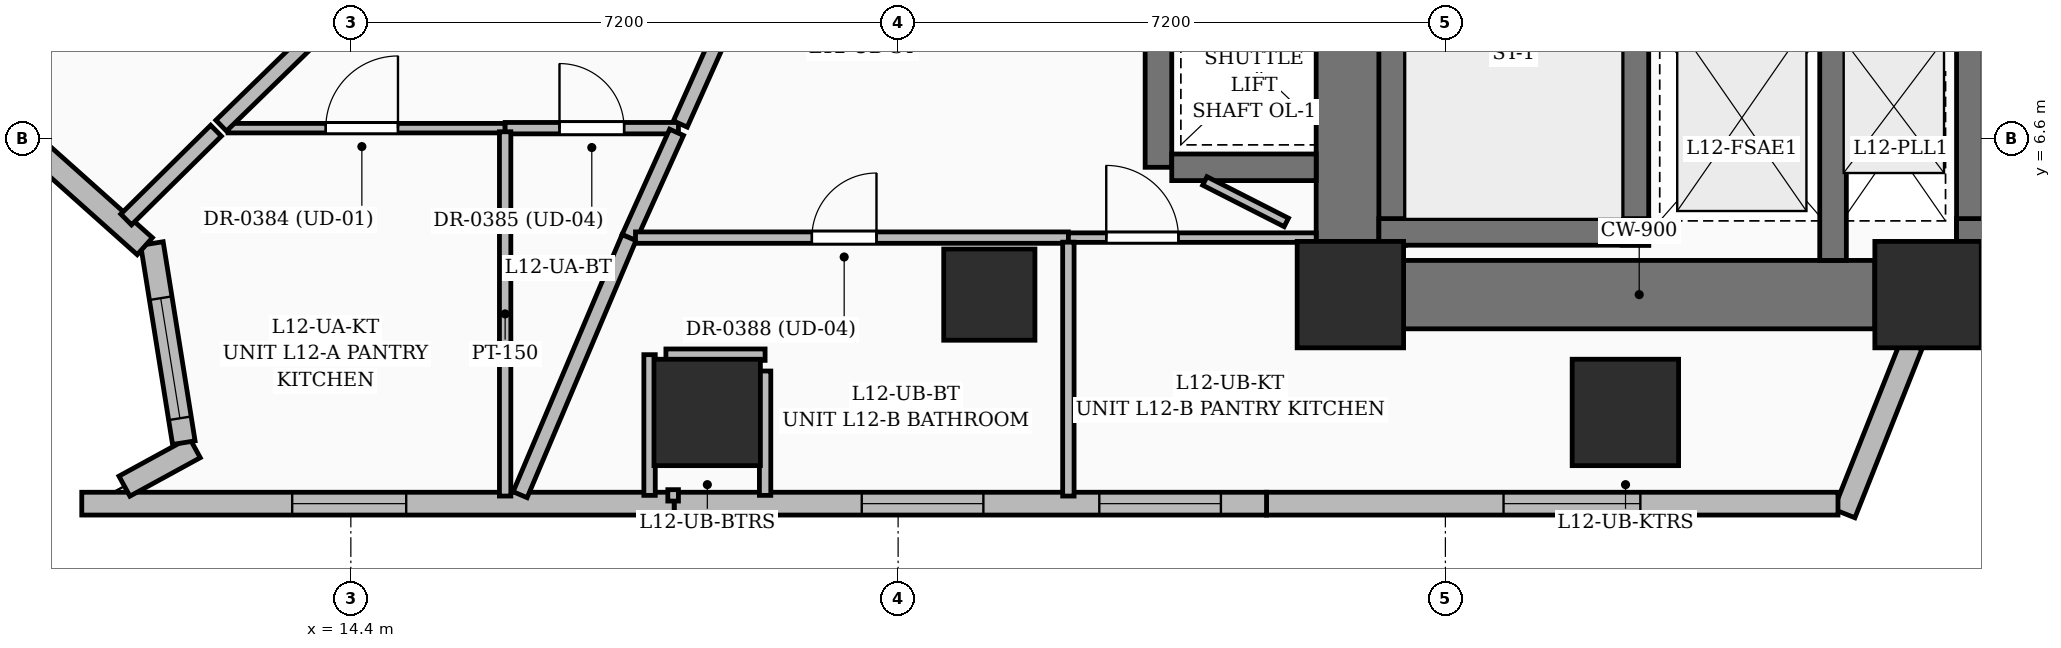
"""IFC4 building model, lengths in metres.
Left out: names, types, materials, properties, quantities, classifications, styles, units other than length and angle.
Written with IfcOpenShell. Run it as: python <this file> out.ifc"""

import sys

from ifc_helpers import new_model, si_unit, direction, frame, frame_2d, origin, origin_2d, place, context, subcontext, project, spatial, rectangle, extrude, element, fill, save


model = new_model("IFC4")
c1 = context("Model", 3, precision=1e-05, world=origin(), true_north=direction((0.0, 1.0)))
c2 = subcontext(c1, "Body", "Model", "MODEL_VIEW")
j1 = project(units=[si_unit("LENGTHUNIT", "METRE"), si_unit("PLANEANGLEUNIT", "RADIAN")], contexts=[c1])
p1 = place(None, origin())
s1 = spatial("IfcSite", under=j1, at=p1, CompositionType="ELEMENT")
p2 = place(p1, origin())
s2 = spatial("IfcBuilding", under=s1, at=p2, CompositionType="ELEMENT")
p3 = place(p2, frame((0.0, 0.0, 53.4)))
s3 = spatial("IfcBuildingStorey", under=s2, at=p3, CompositionType="ELEMENT", Elevation=53.4)
for number, where, z_axis, x_axis in (
    (1, (27.55, 4.55, 0.0), (0.0, 0.0, 1.0), (1.0, 0.0, 0.0)),
    (2, (35.15, 4.55, 0.0), (0.0, 0.0, 1.0), (1.0, 0.0, 0.0)),
):
    element("IfcColumn", number, at=place(p3, frame(where, z_axis=z_axis, x_axis=x_axis)), inside=s3, PredefinedType="COLUMN", context=c2, shape_type="SweptSolid", body=[
        extrude(rectangle(XDim=1.4, YDim=1.4, at=origin_2d()), origin(), (0.0, 0.0, 1.0), 3.6),
    ])
p4 = place(p3, frame((22.8, 4.55, 0.0), z_axis=(0.0, 0.0, 1.0), x_axis=(1.0, 0.0, 0.0)))
e3 = element("IfcColumn", 3, at=p4, inside=s3, PredefinedType="COLUMN", context=c2, shape_type="SweptSolid", body=[
    extrude(rectangle(XDim=1.2, YDim=1.2, at=origin_2d()), origin(), (0.0, 0.0, 1.0), 3.6),
])
p5 = place(p3, frame((28.25, 4.55, 0.0), z_axis=(0.0, 0.0, 1.0), x_axis=(1.0, 0.0, 0.0)))
e4 = element("IfcWall", 4, at=p5, inside=s3, PredefinedType="SHEAR", context=c2, shape_type="SweptSolid", body=[
    extrude(rectangle(XDim=6.2, YDim=0.9, at=frame_2d((3.1, 0.0))), origin(), (0.0, 0.0, 1.0), 3.6),
])
p6 = place(p3, frame((27.55, 5.25, 0.0), z_axis=(0.0, 0.0, 1.0), x_axis=(0.0, 1.0, 0.0)))
e5 = element("IfcWall", 5, at=p6, inside=s3, PredefinedType="SHEAR", context=c2, shape_type="SweptSolid", body=[
    extrude(rectangle(XDim=8.8, YDim=0.9, at=frame_2d((4.4, 0.0))), origin(), (0.0, 0.0, 1.0), 3.6),
])
p7 = place(p3, frame((28.1, 5.2, 0.0), z_axis=(0.0, 0.0, 1.0), x_axis=(0.0, 1.0, 0.0)))
e6 = element("IfcWall", 6, at=p7, inside=s3, PredefinedType="SOLIDWALL", context=c2, shape_type="SweptSolid", body=[
    extrude(rectangle(XDim=9.1, YDim=0.35, at=frame_2d((4.55, 0.0))), origin(), (0.0, 0.0, 1.0), 3.6),
])
p8 = place(p3, frame((31.3, 5.2, 0.0), z_axis=(0.0, 0.0, 1.0), x_axis=(0.0, 1.0, 0.0)))
e7 = element("IfcWall", 7, at=p8, inside=s3, PredefinedType="SOLIDWALL", context=c2, shape_type="SweptSolid", body=[
    extrude(rectangle(XDim=9.1, YDim=0.35, at=frame_2d((4.55, 0.0))), origin(), (0.0, 0.0, 1.0), 3.6),
])
p9 = place(p8, frame((6.02, 0.0, 0.0)))
e8 = element("IfcOpeningElement", 8, at=p9, cuts=e7, PredefinedType="OPENING", context=c2, shape_type="SweptSolid", body=[
    extrude(rectangle(XDim=1.0, YDim=2.15, at=frame_2d((0.5, 1.075))), frame((0.0, 0.185, 0.0), z_axis=(0.0, -1.0, 0.0), x_axis=(1.0, 0.0, 0.0)), (0.0, 0.0, 1.0), 0.37),
])
p10 = place(p3, frame((27.925, 5.375, 0.0), z_axis=(0.0, 0.0, 1.0), x_axis=(1.0, 0.0, 0.0)))
e9 = element("IfcWall", 9, at=p10, inside=s3, PredefinedType="SOLIDWALL", context=c2, shape_type="SweptSolid", body=[
    extrude(rectangle(XDim=3.55, YDim=0.35, at=frame_2d((1.775, 0.0))), origin(), (0.0, 0.0, 1.0), 3.6),
])
p11 = place(p3, frame((35.7, 5.2, 0.0), z_axis=(0.0, 0.0, 1.0), x_axis=(0.0, 1.0, 0.0)))
e10 = element("IfcWall", 10, at=p11, inside=s3, PredefinedType="SOLIDWALL", context=c2, shape_type="SweptSolid", body=[
    extrude(rectangle(XDim=9.1, YDim=0.35, at=frame_2d((4.55, 0.0))), origin(), (0.0, 0.0, 1.0), 3.6),
])
p12 = place(p11, frame((6.02, 0.0, 0.0)))
e11 = element("IfcOpeningElement", 11, at=p12, cuts=e10, PredefinedType="OPENING", context=c2, shape_type="SweptSolid", body=[
    extrude(rectangle(XDim=1.0, YDim=2.15, at=frame_2d((0.5, 1.075))), frame((0.0, 0.185, 0.0), z_axis=(0.0, -1.0, 0.0), x_axis=(1.0, 0.0, 0.0)), (0.0, 0.0, 1.0), 0.37),
])
p13 = place(p3, frame((35.525, 5.375, 0.0), z_axis=(0.0, 0.0, 1.0), x_axis=(1.0, 0.0, 0.0)))
e12 = element("IfcWall", 12, at=p13, inside=s3, PredefinedType="SOLIDWALL", context=c2, shape_type="SweptSolid", body=[
    extrude(rectangle(XDim=3.55, YDim=0.35, at=frame_2d((1.775, 0.0))), origin(), (0.0, 0.0, 1.0), 3.6),
])
p14 = place(p3, frame((33.9, 5.0, 0.0), z_axis=(0.0, 0.0, 1.0), x_axis=(0.0, 1.0, 0.0)))
e13 = element("IfcWall", 13, at=p14, inside=s3, PredefinedType="SOLIDWALL", context=c2, shape_type="SweptSolid", body=[
    extrude(rectangle(XDim=2.925, YDim=0.35, at=frame_2d((1.462, 0.0))), origin(), (0.0, 0.0, 1.0), 3.6),
])
p15 = place(p3, frame((25.025, 6.225, 0.0), z_axis=(0.0, 0.0, 1.0), x_axis=(0.0, 1.0, 0.0)))
e14 = element("IfcWall", 14, at=p15, inside=s3, PredefinedType="SOLIDWALL", context=c2, shape_type="SweptSolid", body=[
    extrude(rectangle(XDim=4.95, YDim=0.35, at=frame_2d((2.475, 0.0))), origin(), (0.0, 0.0, 1.0), 3.6),
])
p16 = place(p3, frame((25.2, 6.225, 0.0), z_axis=(0.0, 0.0, 1.0), x_axis=(1.0, 0.0, 0.0)))
e15 = element("IfcWall", 15, at=p16, inside=s3, PredefinedType="SOLIDWALL", context=c2, shape_type="SweptSolid", body=[
    extrude(rectangle(XDim=1.9, YDim=0.35, at=frame_2d((0.95, 0.0))), origin(), (0.0, 0.0, 1.0), 3.6),
])
for number, where, z_axis, x_axis in (
    (16, (19.088, 3.0, 0.0), (0.0, 0.0, 1.0), (1.0, 0.0, 0.0)),
    (17, (31.168, 3.0, 0.0), (0.0, 0.0, 1.0), (1.0, 0.0, 0.0)),
):
    element("IfcColumn", number, at=place(p3, frame(where, z_axis=z_axis, x_axis=x_axis)), inside=s3, PredefinedType="COLUMN", context=c2, shape_type="SweptSolid", body=[
        extrude(rectangle(XDim=1.4, YDim=1.4, at=origin_2d()), origin(), (0.0, 0.0, 1.0), 3.6),
    ])
p17 = place(p3, frame((34.93, 3.888, 0.0), z_axis=(0.0, 0.0, 1.0), x_axis=(-0.369538313764, -0.9292154942, 0.0)))
e18 = element("IfcWall", 18, at=p17, inside=s3, PredefinedType="SOLIDWALL", context=c2, shape_type="SweptSolid", body=[
    extrude(rectangle(XDim=2.387, YDim=0.3, at=frame_2d((1.193, 0.0))), origin(), (0.0, 0.0, 1.0), 2.375),
])
p18 = place(p3, frame((33.965, 1.8, 0.0), z_axis=(0.0, 0.0, 1.0), x_axis=(-1.0, 0.0, 0.0)))
e19 = element("IfcWall", 19, at=p18, inside=s3, PredefinedType="SOLIDWALL", context=c2, shape_type="SweptSolid", body=[
    extrude(rectangle(XDim=7.518, YDim=0.3, at=frame_2d((3.759, 0.0))), origin(), (0.0, 0.0, 1.0), 3.35),
])
p19 = place(p18, frame((2.6, 0.0, 0.6)))
e20 = element("IfcOpeningElement", 20, at=p19, cuts=e19, PredefinedType="OPENING", context=c2, shape_type="SweptSolid", body=[
    extrude(rectangle(XDim=1.8, YDim=2.1, at=frame_2d((0.9, 1.05))), frame((0.0, 0.16, 0.0), z_axis=(0.0, -1.0, 0.0), x_axis=(1.0, 0.0, 0.0)), (0.0, 0.0, 1.0), 0.32),
])
p20 = place(p3, frame((26.447, 1.8, 0.0), z_axis=(0.0, 0.0, 1.0), x_axis=(-1.0, 0.0, 0.0)))
e21 = element("IfcWall", 21, at=p20, inside=s3, PredefinedType="SOLIDWALL", context=c2, shape_type="SweptSolid", body=[
    extrude(rectangle(XDim=7.793, YDim=0.3, at=frame_2d((3.897, 0.0))), origin(), (0.0, 0.0, 1.0), 3.35),
])
p21 = place(p20, frame((3.725, 0.0, 0.55)))
e22 = element("IfcOpeningElement", 22, at=p21, cuts=e21, PredefinedType="OPENING", context=c2, shape_type="SweptSolid", body=[
    extrude(rectangle(XDim=1.6, YDim=2.2, at=frame_2d((0.8, 1.1))), frame((0.0, 0.16, 0.0), z_axis=(0.0, -1.0, 0.0), x_axis=(1.0, 0.0, 0.0)), (0.0, 0.0, 1.0), 0.32),
])
p22 = place(p20, frame((0.6, 0.0, 0.55)))
e23 = element("IfcOpeningElement", 23, at=p22, cuts=e21, PredefinedType="OPENING", context=c2, shape_type="SweptSolid", body=[
    extrude(rectangle(XDim=1.6, YDim=2.2, at=frame_2d((0.8, 1.1))), frame((0.0, 0.16, 0.0), z_axis=(0.0, -1.0, 0.0), x_axis=(1.0, 0.0, 0.0)), (0.0, 0.0, 1.0), 0.32),
])
p23 = place(p3, frame((18.653, 1.8, 0.0), z_axis=(0.0, 0.0, 1.0), x_axis=(-1.0, 0.0, 0.0)))
e24 = element("IfcWall", 24, at=p23, inside=s3, PredefinedType="SOLIDWALL", context=c2, shape_type="SweptSolid", body=[
    extrude(rectangle(XDim=7.793, YDim=0.3, at=frame_2d((3.896, 0.0))), origin(), (0.0, 0.0, 1.0), 3.35),
])
p24 = place(p23, frame((3.525, 0.0, 0.6)))
e25 = element("IfcOpeningElement", 25, at=p24, cuts=e24, PredefinedType="OPENING", context=c2, shape_type="SweptSolid", body=[
    extrude(rectangle(XDim=1.5, YDim=2.1, at=frame_2d((0.75, 1.05))), frame((0.0, 0.16, 0.0), z_axis=(0.0, -1.0, 0.0), x_axis=(1.0, 0.0, 0.0)), (0.0, 0.0, 1.0), 0.32),
])
p25 = place(p3, frame((11.421, 2.03, 0.0), z_axis=(0.0, 0.0, 1.0), x_axis=(0.877488347229, 0.479597957124, 0.0)))
e26 = element("IfcWall", 26, at=p25, inside=s3, PredefinedType="SOLIDWALL", context=c2, shape_type="SweptSolid", body=[
    extrude(rectangle(XDim=1.055, YDim=0.3, at=frame_2d((0.527, 0.0))), origin(), (0.0, 0.0, 1.0), 3.35),
])
p26 = place(p3, frame((12.203, 2.602, 0.0), z_axis=(0.0, 0.0, 1.0), x_axis=(-0.158173523246, 0.987411330978, 0.0)))
e27 = element("IfcWall", 27, at=p26, inside=s3, PredefinedType="SOLIDWALL", context=c2, shape_type="SweptSolid", body=[
    extrude(rectangle(XDim=2.653, YDim=0.3, at=frame_2d((1.327, 0.0))), origin(), (0.0, 0.0, 1.0), 3.35),
])
p27 = place(p26, frame((0.325, 0.0, 0.55)))
e28 = element("IfcOpeningElement", 28, at=p27, cuts=e27, PredefinedType="OPENING", context=c2, shape_type="SweptSolid", body=[
    extrude(rectangle(XDim=1.6, YDim=2.2, at=frame_2d((0.8, 1.1))), frame((0.0, 0.16, 0.0), z_axis=(0.0, -1.0, 0.0), x_axis=(1.0, 0.0, 0.0)), (0.0, 0.0, 1.0), 0.32),
])
p28 = place(p3, frame((11.689, 5.187, 0.0), z_axis=(0.0, 0.0, 1.0), x_axis=(-0.745975491387, 0.665973397555, 0.0)))
e29 = element("IfcWall", 29, at=p28, inside=s3, PredefinedType="SOLIDWALL", context=c2, shape_type="SweptSolid", body=[
    extrude(rectangle(XDim=2.634, YDim=0.3, at=frame_2d((1.317, 0.0))), origin(), (0.0, 0.0, 1.0), 3.35),
])
p29 = place(p3, frame((8.861, 6.578, 0.0), z_axis=(0.0, 0.0, 1.0), x_axis=(0.539510604495, 0.841978804744, 0.0)))
e30 = element("IfcWall", 30, at=p29, inside=s3, PredefinedType="SOLIDWALL", context=c2, shape_type="SweptSolid", body=[
    extrude(rectangle(XDim=6.534, YDim=0.3, at=frame_2d((3.267, 0.0))), origin(), (0.0, 0.0, 1.0), 3.35),
])
p30 = place(p29, frame((2.735, 0.0, 0.55)))
e31 = element("IfcOpeningElement", 31, at=p30, cuts=e30, PredefinedType="OPENING", context=c2, shape_type="SweptSolid", body=[
    extrude(rectangle(XDim=1.6, YDim=2.2, at=frame_2d((0.8, 1.1))), frame((0.0, 0.16, 0.0), z_axis=(0.0, -1.0, 0.0), x_axis=(1.0, 0.0, 0.0)), (0.0, 0.0, 1.0), 0.32),
])
p31 = place(p3, frame((12.785, 6.74, 0.0), z_axis=(0.0, 0.0, 1.0), x_axis=(1.0, 0.0, 0.0)))
e32 = element("IfcWall", 32, at=p31, inside=s3, PredefinedType="PARTITIONING", context=c2, shape_type="SweptSolid", body=[
    extrude(rectangle(XDim=3.645, YDim=0.125, at=frame_2d((1.823, 0.0))), origin(), (0.0, 0.0, 1.0), 2.37),
])
p32 = place(p31, frame((1.285, 0.0, 0.0)))
e33 = element("IfcOpeningElement", 33, at=p32, cuts=e32, PredefinedType="OPENING", context=c2, shape_type="SweptSolid", body=[
    extrude(rectangle(XDim=0.95, YDim=2.2, at=frame_2d((0.475, 1.1))), frame((0.0, 0.072, 0.0), z_axis=(0.0, -1.0, 0.0), x_axis=(1.0, 0.0, 0.0)), (0.0, 0.0, 1.0), 0.145),
])
p33 = place(p3, frame((16.43, 6.74, 0.0), z_axis=(0.0, 0.0, 1.0), x_axis=(1.0, 0.0, 0.0)))
e34 = element("IfcWall", 34, at=p33, inside=s3, PredefinedType="PARTITIONING", context=c2, shape_type="SweptSolid", body=[
    extrude(rectangle(XDim=2.28, YDim=0.15, at=frame_2d((1.14, 0.0))), origin(), (0.0, 0.0, 1.0), 2.37),
])
p34 = place(p33, frame((0.715, 0.0, 0.0)))
e35 = element("IfcOpeningElement", 35, at=p34, cuts=e34, PredefinedType="OPENING", context=c2, shape_type="SweptSolid", body=[
    extrude(rectangle(XDim=0.85, YDim=2.1, at=frame_2d((0.425, 1.05))), frame((0.0, 0.085, 0.0), z_axis=(0.0, -1.0, 0.0), x_axis=(1.0, 0.0, 0.0)), (0.0, 0.0, 1.0), 0.17),
])
p35 = place(p3, frame((18.735, 6.795, 0.0), z_axis=(0.0, 0.0, 1.0), x_axis=(0.408515389568, 0.912751431928, 0.0)))
e36 = element("IfcWall", 36, at=p35, inside=s3, PredefinedType="PARTITIONING", context=c2, shape_type="SweptSolid", body=[
    extrude(rectangle(XDim=6.524, YDim=0.2, at=frame_2d((3.262, 0.0))), origin(), (0.0, 0.0, 1.0), 2.279),
])
p36 = place(p3, frame((15.64, 9.64, 0.0), z_axis=(0.0, 0.0, 1.0), x_axis=(-0.716663345688, -0.697419277728, 0.0)))
e37 = element("IfcWall", 37, at=p36, inside=s3, PredefinedType="PARTITIONING", context=c2, shape_type="SweptSolid", body=[
    extrude(rectangle(XDim=4.11, YDim=0.2, at=frame_2d((2.055, 0.0))), origin(), (0.0, 0.0, 1.0), 2.37),
])
p37 = place(p3, frame((16.43, 1.9, 0.0), z_axis=(0.0, 0.0, 1.0), x_axis=(0.0, 1.0, 0.0)))
e38 = element("IfcWall", 38, at=p37, inside=s3, PredefinedType="PARTITIONING", context=c2, shape_type="SweptSolid", body=[
    extrude(rectangle(XDim=4.792, YDim=0.15, at=frame_2d((2.396, 0.0))), origin(), (0.0, 0.0, 1.0), 2.37),
])
p38 = place(p3, frame((12.626, 6.707, 0.0), z_axis=(0.0, 0.0, 1.0), x_axis=(-0.711501350424, -0.702684728982, 0.0)))
e39 = element("IfcWall", 39, at=p38, inside=s3, PredefinedType="PARTITIONING", context=c2, shape_type="SweptSolid", body=[
    extrude(rectangle(XDim=1.661, YDim=0.2, at=frame_2d((0.831, 0.0))), origin(), (0.0, 0.0, 1.0), 3.35),
])
p39 = place(p3, frame((18.06, 5.3, 0.0), z_axis=(0.0, 0.0, 1.0), x_axis=(0.411393031605, 0.911458048155, 0.0)))
e40 = element("IfcWall", 40, at=p39, inside=s3, PredefinedType="PARTITIONING", context=c2, shape_type="SweptSolid", body=[
    extrude(rectangle(XDim=1.52, YDim=0.2, at=frame_2d((0.76, 0.0))), origin(), (0.0, 0.0, 1.0), 3.01),
])
p40 = place(p3, frame((16.627, 1.918, 0.0), z_axis=(0.0, 0.0, 1.0), x_axis=(0.390153809481, 0.920749697229, 0.0)))
e41 = element("IfcWall", 41, at=p40, inside=s3, PredefinedType="PARTITIONING", context=c2, shape_type="SweptSolid", body=[
    extrude(rectangle(XDim=3.673, YDim=0.2, at=frame_2d((1.836, 0.0))), origin(), (0.0, 0.0, 1.0), 2.37),
])
p41 = place(p3, frame((18.145, 5.3, 0.0), z_axis=(0.0, 0.0, 1.0), x_axis=(1.0, 0.0, 0.0)))
e42 = element("IfcWall", 42, at=p41, inside=s3, PredefinedType="PARTITIONING", context=c2, shape_type="SweptSolid", body=[
    extrude(rectangle(XDim=5.695, YDim=0.15, at=frame_2d((2.848, 0.0))), origin(), (0.0, 0.0, 1.0), 3.01),
])
p42 = place(p41, frame((2.32, 0.0, 0.0)))
e43 = element("IfcOpeningElement", 43, at=p42, cuts=e42, PredefinedType="OPENING", context=c2, shape_type="SweptSolid", body=[
    extrude(rectangle(XDim=0.85, YDim=2.1, at=frame_2d((0.425, 1.05))), frame((0.0, 0.085, 0.0), z_axis=(0.0, -1.0, 0.0), x_axis=(1.0, 0.0, 0.0)), (0.0, 0.0, 1.0), 0.17),
])
p43 = place(p3, frame((23.84, 5.3, 0.0), z_axis=(0.0, 0.0, 1.0), x_axis=(1.0, 0.0, 0.0)))
e44 = element("IfcWall", 44, at=p43, inside=s3, PredefinedType="PARTITIONING", context=c2, shape_type="SweptSolid", body=[
    extrude(rectangle(XDim=3.26, YDim=0.125, at=frame_2d((1.63, 0.0))), origin(), (0.0, 0.0, 1.0), 3.35),
])
p44 = place(p43, frame((0.498, 0.0, 0.0)))
e45 = element("IfcOpeningElement", 45, at=p44, cuts=e44, PredefinedType="OPENING", context=c2, shape_type="SweptSolid", body=[
    extrude(rectangle(XDim=0.95, YDim=2.2, at=frame_2d((0.475, 1.1))), frame((0.0, 0.072, 0.0), z_axis=(0.0, -1.0, 0.0), x_axis=(1.0, 0.0, 0.0)), (0.0, 0.0, 1.0), 0.145),
])
p45 = place(p3, frame((23.84, 1.9, 0.0), z_axis=(0.0, 0.0, 1.0), x_axis=(0.0, 1.0, 0.0)))
e46 = element("IfcWall", 46, at=p45, inside=s3, PredefinedType="PARTITIONING", context=c2, shape_type="SweptSolid", body=[
    extrude(rectangle(XDim=3.34, YDim=0.15, at=frame_2d((1.67, 0.0))), origin(), (0.0, 0.0, 1.0), 2.309),
])
p46 = place(p3, frame((25.635, 6.046, 0.0), z_axis=(0.0, 0.0, 1.0), x_axis=(0.891197428161, -0.453615634694, 0.0)))
e47 = element("IfcWall", 47, at=p46, inside=s3, PredefinedType="PARTITIONING", context=c2, shape_type="SweptSolid", body=[
    extrude(rectangle(XDim=1.203, YDim=0.125, at=frame_2d((0.602, 0.0))), origin(), (0.0, 0.0, 1.0), 3.35),
])
p47 = place(p3, frame((18.71, 1.909, 0.0), z_axis=(0.0, 0.0, 1.0), x_axis=(-1.0, 0.0, 0.0)))
e48 = element("IfcWall", 48, at=p47, inside=s3, PredefinedType="PARTITIONING", context=c2, shape_type="SweptSolid", body=[
    extrude(rectangle(XDim=0.14, YDim=0.15, at=frame_2d((0.07, 0.0))), origin(), (0.0, 0.0, 1.0), 3.35),
])
p48 = place(p3, frame((18.33, 1.909, 0.0), z_axis=(0.0, 0.0, 1.0), x_axis=(0.0, 1.0, 0.0)))
e49 = element("IfcWall", 49, at=p48, inside=s3, PredefinedType="PARTITIONING", context=c2, shape_type="SweptSolid", body=[
    extrude(rectangle(XDim=1.851, YDim=0.15, at=frame_2d((0.926, 0.0))), origin(), (0.0, 0.0, 1.0), 2.37),
])
p49 = place(p3, frame((18.545, 3.76, 0.0), z_axis=(0.0, 0.0, 1.0), x_axis=(1.0, 0.0, 0.0)))
e50 = element("IfcWall", 50, at=p49, inside=s3, PredefinedType="PARTITIONING", context=c2, shape_type="SweptSolid", body=[
    extrude(rectangle(XDim=1.305, YDim=0.15, at=frame_2d((0.653, 0.0))), origin(), (0.0, 0.0, 1.0), 2.37),
])
p50 = place(p3, frame((19.85, 3.545, 0.0), z_axis=(0.0, 0.0, 1.0), x_axis=(0.0, -1.0, 0.0)))
e51 = element("IfcWall", 51, at=p50, inside=s3, PredefinedType="PARTITIONING", context=c2, shape_type="SweptSolid", body=[
    extrude(rectangle(XDim=1.636, YDim=0.15, at=frame_2d((0.818, 0.0))), origin(), (0.0, 0.0, 1.0), 2.279),
])
p51 = place(p19, origin())
e52 = element("IfcWindow", 52, at=p51, inside=s3, PartitioningType="SINGLE_PANEL", PredefinedType="WINDOW", context=c2, shape_type="SweptSolid", body=[
    extrude(rectangle(XDim=1.8, YDim=2.1, at=frame_2d((0.9, 1.05))), frame((0.0, 0.03, 0.0), z_axis=(0.0, -1.0, 0.0), x_axis=(1.0, 0.0, 0.0)), (0.0, 0.0, 1.0), 0.06),
])
fill(e20, e52)
p52 = place(p21, origin())
e53 = element("IfcWindow", 53, at=p52, inside=s3, PartitioningType="SINGLE_PANEL", PredefinedType="WINDOW", context=c2, shape_type="SweptSolid", body=[
    extrude(rectangle(XDim=1.6, YDim=2.2, at=frame_2d((0.8, 1.1))), frame((0.0, 0.03, 0.0), z_axis=(0.0, -1.0, 0.0), x_axis=(1.0, 0.0, 0.0)), (0.0, 0.0, 1.0), 0.06),
])
fill(e22, e53)
p53 = place(p22, origin())
e54 = element("IfcWindow", 54, at=p53, inside=s3, PartitioningType="SINGLE_PANEL", PredefinedType="WINDOW", context=c2, shape_type="SweptSolid", body=[
    extrude(rectangle(XDim=1.6, YDim=2.2, at=frame_2d((0.8, 1.1))), frame((0.0, 0.03, 0.0), z_axis=(0.0, -1.0, 0.0), x_axis=(1.0, 0.0, 0.0)), (0.0, 0.0, 1.0), 0.06),
])
fill(e23, e54)
p54 = place(p24, origin())
e55 = element("IfcWindow", 55, at=p54, inside=s3, PartitioningType="SINGLE_PANEL", PredefinedType="WINDOW", context=c2, shape_type="SweptSolid", body=[
    extrude(rectangle(XDim=1.5, YDim=2.1, at=frame_2d((0.75, 1.05))), frame((0.0, 0.03, 0.0), z_axis=(0.0, -1.0, 0.0), x_axis=(1.0, 0.0, 0.0)), (0.0, 0.0, 1.0), 0.06),
])
fill(e25, e55)
p55 = place(p27, origin())
e56 = element("IfcWindow", 56, at=p55, inside=s3, PartitioningType="SINGLE_PANEL", PredefinedType="WINDOW", context=c2, shape_type="SweptSolid", body=[
    extrude(rectangle(XDim=1.6, YDim=2.2, at=frame_2d((0.8, 1.1))), frame((0.0, 0.03, 0.0), z_axis=(0.0, -1.0, 0.0), x_axis=(1.0, 0.0, 0.0)), (0.0, 0.0, 1.0), 0.06),
])
fill(e28, e56)
p56 = place(p32, origin())
e57 = element("IfcDoor", 57, at=p56, inside=s3, OperationType="SINGLE_SWING_RIGHT", PredefinedType="DOOR", context=c2, shape_type="SweptSolid", body=[
    extrude(rectangle(XDim=0.95, YDim=2.2, at=frame_2d((0.475, 1.1))), frame((0.0, 0.025, 0.0), z_axis=(0.0, -1.0, 0.0), x_axis=(1.0, 0.0, 0.0)), (0.0, 0.0, 1.0), 0.05),
])
fill(e33, e57)
p57 = place(p34, origin())
e58 = element("IfcDoor", 58, at=p57, inside=s3, OperationType="SINGLE_SWING_LEFT", PredefinedType="DOOR", context=c2, shape_type="SweptSolid", body=[
    extrude(rectangle(XDim=0.85, YDim=2.1, at=frame_2d((0.425, 1.05))), frame((0.0, 0.025, 0.0), z_axis=(0.0, -1.0, 0.0), x_axis=(1.0, 0.0, 0.0)), (0.0, 0.0, 1.0), 0.05),
])
fill(e35, e58)
p58 = place(p44, origin())
e59 = element("IfcDoor", 59, at=p58, inside=s3, OperationType="SINGLE_SWING_LEFT", PredefinedType="DOOR", context=c2, shape_type="SweptSolid", body=[
    extrude(rectangle(XDim=0.95, YDim=2.2, at=frame_2d((0.475, 1.1))), frame((0.0, 0.025, 0.0), z_axis=(0.0, -1.0, 0.0), x_axis=(1.0, 0.0, 0.0)), (0.0, 0.0, 1.0), 0.05),
])
fill(e45, e59)
p59 = place(p42, origin())
e60 = element("IfcDoor", 60, at=p59, inside=s3, OperationType="SINGLE_SWING_RIGHT", PredefinedType="DOOR", context=c2, shape_type="SweptSolid", body=[
    extrude(rectangle(XDim=0.85, YDim=2.1, at=frame_2d((0.425, 1.05))), frame((0.0, 0.025, 0.0), z_axis=(0.0, -1.0, 0.0), x_axis=(1.0, 0.0, 0.0)), (0.0, 0.0, 1.0), 0.05),
])
fill(e43, e60)
save(model, sys.argv[1])
